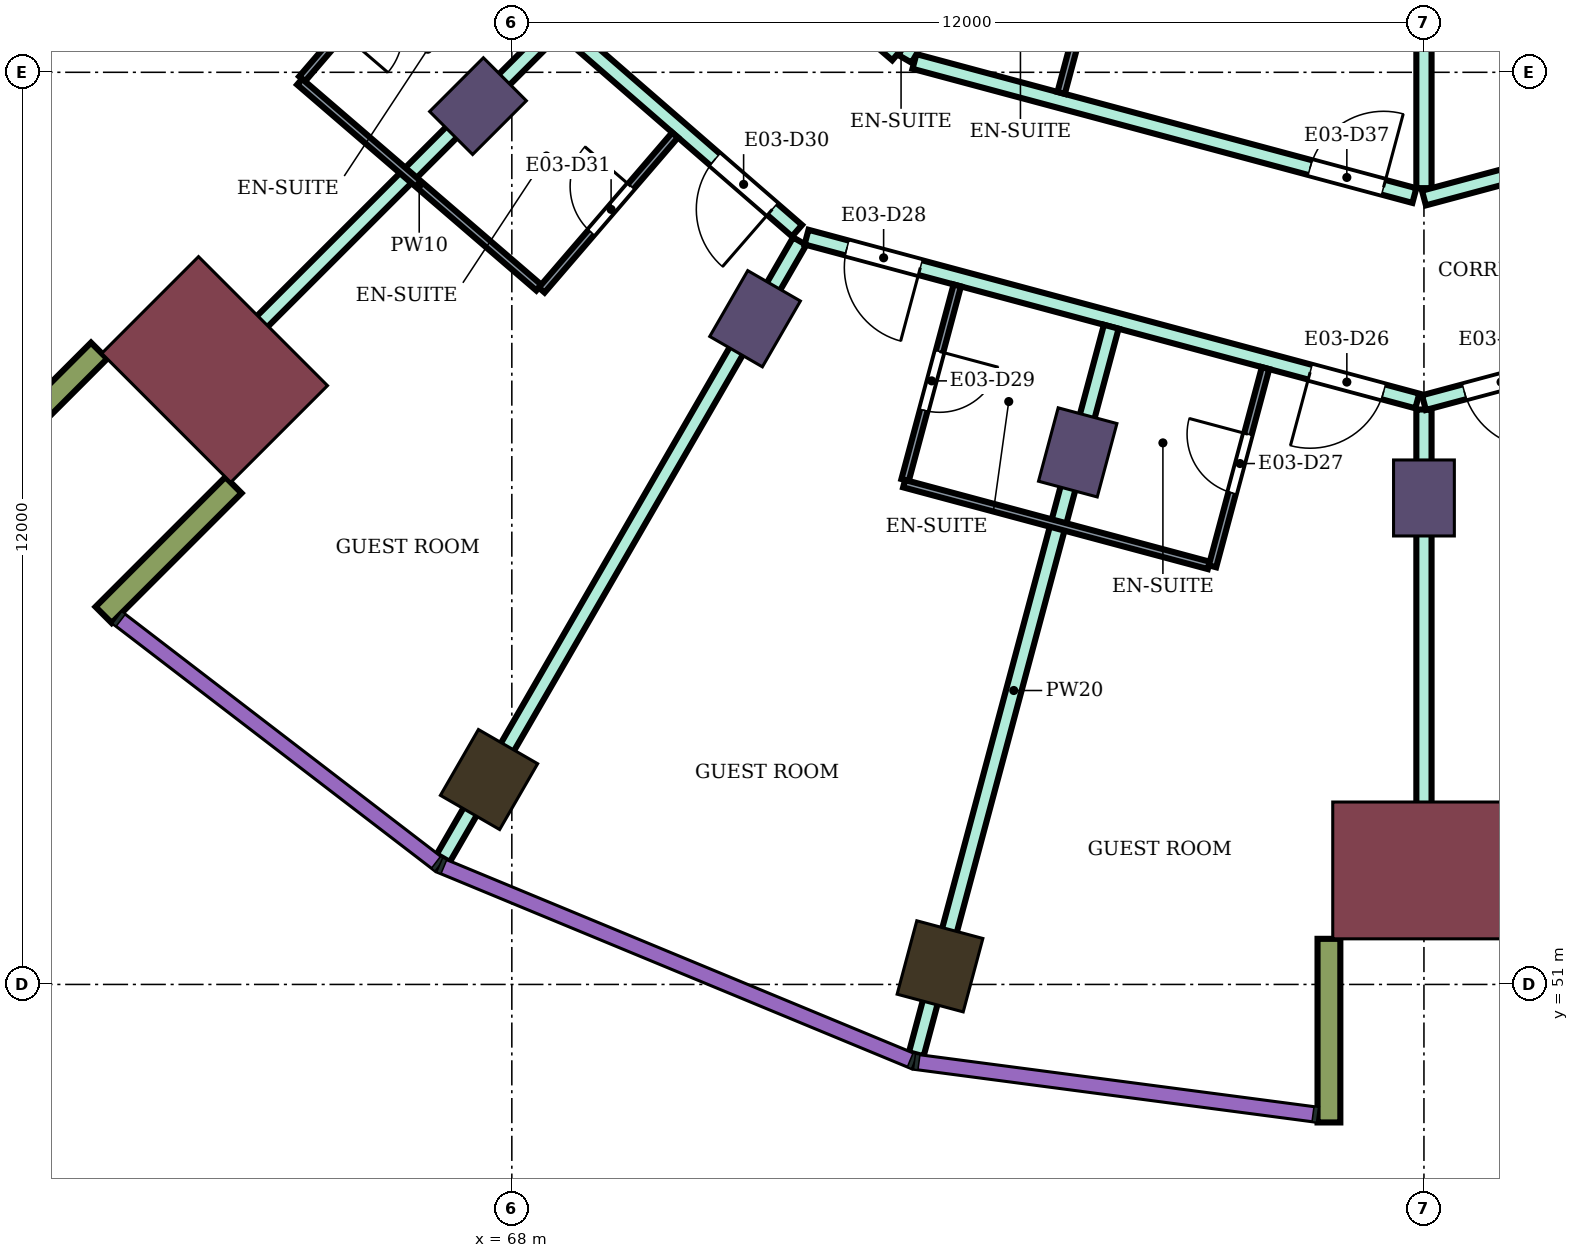
"""IFC4 building model, lengths in metres.
Left out: names, types, materials, properties, quantities, classifications, styles, units other than length and angle.
Written with IfcOpenShell. Run it as: python <this file> out.ifc"""

import sys

from ifc_helpers import new_model, si_unit, direction, frame, frame_2d, origin, origin_2d, place, context, subcontext, project, spatial, rectangle, extrude, element, fill, save


model = new_model("IFC4")
c1 = context("Model", 3, precision=1e-05, world=origin(), true_north=direction((0.0, 1.0)))
c2 = subcontext(c1, "Body", "Model", "MODEL_VIEW")
j1 = project(units=[si_unit("LENGTHUNIT", "METRE"), si_unit("PLANEANGLEUNIT", "RADIAN")], contexts=[c1])
p1 = place(None, origin())
s1 = spatial("IfcSite", under=j1, at=p1, CompositionType="ELEMENT")
p2 = place(p1, origin())
s2 = spatial("IfcBuilding", under=s1, at=p2, CompositionType="ELEMENT")
p3 = place(p2, frame((0.0, 0.0, 141.9)))
s3 = spatial("IfcBuildingStorey", under=s2, at=p3, CompositionType="ELEMENT", Elevation=141.9)
for number, where, z_axis, x_axis in (
    (1, (67.7, 53.696, 0.0), (0.0, 0.0, 1.0), (-0.5, -0.866, 0.0)),
    (2, (73.633, 51.238, 0.0), (0.0, 0.0, 1.0), (-0.259, -0.966, 0.0)),
):
    element("IfcColumn", number, at=place(p3, frame(where, z_axis=z_axis, x_axis=x_axis)), inside=s3, PredefinedType="COLUMN", context=c2, shape_type="SweptSolid", body=[
        extrude(rectangle(XDim=1.0, YDim=0.9, at=origin_2d()), origin(), (0.0, 0.0, 1.0), 3.9),
    ])
for number, where, z_axis, x_axis in (
    (3, (67.555, 62.555, 0.0), (0.0, 0.0, 1.0), (-0.707, -0.707, 0.0)),
    (4, (71.2, 59.758, 0.0), (0.0, 0.0, 1.0), (-0.5, -0.866, 0.0)),
    (5, (75.445, 58.0, 0.0), (0.0, 0.0, 1.0), (-0.259, -0.966, 0.0)),
    (6, (80.0, 57.4, 0.0), (0.0, 0.0, 1.0), (0.0, -1.0, 0.0)),
):
    element("IfcColumn", number, at=place(p3, frame(where, z_axis=z_axis, x_axis=x_axis)), inside=s3, PredefinedType="COLUMN", context=c2, shape_type="SweptSolid", body=[
        extrude(rectangle(XDim=1.0, YDim=0.8, at=origin_2d()), origin(), (0.0, 0.0, 1.0), 3.9),
    ])
for number, where, z_axis, x_axis in (
    (7, (64.09, 59.09, 0.0), (0.0, 0.0, 1.0), (-0.707, -0.707, 0.0)),
    (8, (80.0, 52.5, 0.0), (0.0, 0.0, 1.0), (0.0, -1.0, 0.0)),
):
    element("IfcColumn", number, at=place(p3, frame(where, z_axis=z_axis, x_axis=x_axis)), inside=s3, PredefinedType="COLUMN", context=c2, shape_type="SweptSolid", body=[
        extrude(rectangle(XDim=1.8, YDim=2.4, at=origin_2d()), origin(), (0.0, 0.0, 1.0), 3.9),
    ])
for number, where, z_axis, x_axis in (
    (9, (62.57, 59.338, 0.0), (0.0, 0.0, 1.0), (-0.707, -0.707, 0.0)),
    (10, (64.338, 57.57, 0.0), (0.0, 0.0, 1.0), (-0.707, -0.707, 0.0)),
    (11, (78.75, 51.6, 0.0), (0.0, 0.0, 1.0), (0.0, -1.0, 0.0)),
):
    element("IfcWall", number, at=place(p3, frame(where, z_axis=z_axis, x_axis=x_axis)), inside=s3, PredefinedType="NOTDEFINED", context=c2, shape_type="SweptSolid", body=[
        extrude(rectangle(XDim=2.416, YDim=0.3, at=frame_2d((1.208, 0.0))), origin(), (0.0, 0.0, 1.0), 3.9),
    ])
p4 = place(p3, frame((63.593, 58.599, 0.0), z_axis=(0.0, 0.0, 1.0), x_axis=(0.707228748718, 0.706984792613, 0.0)))
e12 = element("IfcWall", 12, at=p4, inside=s3, PredefinedType="PARTITIONING", context=c2, shape_type="SweptSolid", body=[
    extrude(rectangle(XDim=7.005, YDim=0.2, at=frame_2d((3.503, 0.0))), origin(), (0.0, 0.0, 1.0), 3.45),
])
p5 = place(p3, frame((67.082, 64.972, 0.0), z_axis=(0.0, 0.0, 1.0), x_axis=(0.755031061605, -0.65568902386, 0.0)))
e13 = element("IfcWall", 13, at=p5, inside=s3, PredefinedType="PARTITIONING", context=c2, shape_type="SweptSolid", body=[
    extrude(rectangle(XDim=6.186, YDim=0.2, at=frame_2d((3.093, 0.0))), origin(), (0.0, 0.0, 1.0), 3.45),
])
p6 = place(p5, frame((4.755, 0.0, 0.0)))
e14 = element("IfcOpeningElement", 14, at=p6, cuts=e13, PredefinedType="OPENING", context=c2, shape_type="SweptSolid", body=[
    extrude(rectangle(XDim=1.0, YDim=2.1, at=frame_2d((0.5, 1.05))), frame((0.0, 0.11, 0.0), z_axis=(0.0, -1.0, 0.0), x_axis=(1.0, 0.0, 0.0)), (0.0, 0.0, 1.0), 0.22),
])
p7 = place(p3, frame((67.097, 52.661, 0.0), z_axis=(0.0, 0.0, 1.0), x_axis=(0.500236379769, 0.865888886841, 0.0)))
e15 = element("IfcWall", 15, at=p7, inside=s3, PredefinedType="PARTITIONING", context=c2, shape_type="SweptSolid", body=[
    extrude(rectangle(XDim=9.375, YDim=0.2, at=frame_2d((4.688, 0.0))), origin(), (0.0, 0.0, 1.0), 3.45),
])
p8 = place(p3, frame((69.158, 66.6, 0.0), z_axis=(0.0, 0.0, 1.0), x_axis=(0.757976058094, -0.652282373943, 0.0)))
e16 = element("IfcWall", 16, at=p8, inside=s3, PredefinedType="PARTITIONING", context=c2, shape_type="SweptSolid", body=[
    extrude(rectangle(XDim=5.16, YDim=0.2, at=frame_2d((2.58, 0.0))), origin(), (0.0, 0.0, 1.0), 3.45),
])
p9 = place(p8, frame((1.6, 0.0, 0.0)))
e17 = element("IfcOpeningElement", 17, at=p9, cuts=e16, PredefinedType="OPENING", context=c2, shape_type="SweptSolid", body=[
    extrude(rectangle(XDim=1.0, YDim=2.1, at=frame_2d((0.5, 1.05))), frame((0.0, 0.11, 0.0), z_axis=(0.0, -1.0, 0.0), x_axis=(1.0, 0.0, 0.0)), (0.0, 0.0, 1.0), 0.22),
])
p10 = place(p3, frame((71.877, 60.832, 0.0), z_axis=(0.0, 0.0, 1.0), x_axis=(0.965852509869, -0.259092510851, 0.0)))
e18 = element("IfcWall", 18, at=p10, inside=s3, PredefinedType="PARTITIONING", context=c2, shape_type="SweptSolid", body=[
    extrude(rectangle(XDim=8.32, YDim=0.2, at=frame_2d((4.16, 0.0))), origin(), (0.0, 0.0, 1.0), 3.45),
])
p11 = place(p10, frame((6.86, 0.0, 0.0)))
e19 = element("IfcOpeningElement", 19, at=p11, cuts=e18, PredefinedType="OPENING", context=c2, shape_type="SweptSolid", body=[
    extrude(rectangle(XDim=1.0, YDim=2.1, at=frame_2d((0.5, 1.05))), frame((0.0, 0.11, 0.0), z_axis=(0.0, -1.0, 0.0), x_axis=(1.0, 0.0, 0.0)), (0.0, 0.0, 1.0), 0.22),
])
p12 = place(p10, frame((0.55, 0.0, 0.0)))
e20 = element("IfcOpeningElement", 20, at=p12, cuts=e18, PredefinedType="OPENING", context=c2, shape_type="SweptSolid", body=[
    extrude(rectangle(XDim=1.0, YDim=2.1, at=frame_2d((0.5, 1.05))), frame((0.0, 0.11, 0.0), z_axis=(0.0, -1.0, 0.0), x_axis=(1.0, 0.0, 0.0)), (0.0, 0.0, 1.0), 0.22),
])
p13 = place(p3, frame((73.297, 63.143, 0.0), z_axis=(0.0, 0.0, 1.0), x_axis=(0.965859030528, -0.25906820173, 0.0)))
e21 = element("IfcWall", 21, at=p13, inside=s3, PredefinedType="PARTITIONING", context=c2, shape_type="SweptSolid", body=[
    extrude(rectangle(XDim=6.81, YDim=0.2, at=frame_2d((3.405, 0.0))), origin(), (0.0, 0.0, 1.0), 3.45),
])
p14 = place(p13, frame((5.39, 0.0, 0.0)))
e22 = element("IfcOpeningElement", 22, at=p14, cuts=e21, PredefinedType="OPENING", context=c2, shape_type="SweptSolid", body=[
    extrude(rectangle(XDim=1.0, YDim=2.1, at=frame_2d((0.5, 1.05))), frame((0.0, 0.11, 0.0), z_axis=(0.0, -1.0, 0.0), x_axis=(1.0, 0.0, 0.0)), (0.0, 0.0, 1.0), 0.22),
])
p15 = place(p3, frame((73.173, 63.176, 0.0), z_axis=(0.0, 0.0, 1.0), x_axis=(0.500239348149, 0.865887171959, 0.0)))
e23 = element("IfcWall", 23, at=p15, inside=s3, PredefinedType="PARTITIONING", context=c2, shape_type="SweptSolid", body=[
    extrude(rectangle(XDim=5.955, YDim=0.2, at=frame_2d((2.978, 0.0))), origin(), (0.0, 0.0, 1.0), 3.45),
])
p16 = place(p3, frame((73.321, 50.081, 0.0), z_axis=(0.0, 0.0, 1.0), x_axis=(0.258889198551, 0.965907025999, 0.0)))
e24 = element("IfcWall", 24, at=p16, inside=s3, PredefinedType="PARTITIONING", context=c2, shape_type="SweptSolid", body=[
    extrude(rectangle(XDim=9.909, YDim=0.2, at=frame_2d((4.955, 0.0))), origin(), (0.0, 0.0, 1.0), 3.45),
])
p17 = place(p3, frame((80.0, 51.8, 0.0), z_axis=(0.0, 0.0, 1.0), x_axis=(0.0, 1.0, 0.0)))
e25 = element("IfcWall", 25, at=p17, inside=s3, PredefinedType="PARTITIONING", context=c2, shape_type="SweptSolid", body=[
    extrude(rectangle(XDim=6.764, YDim=0.2, at=frame_2d((3.382, 0.0))), origin(), (0.0, 0.0, 1.0), 3.45),
])
p18 = place(p3, frame((80.0, 58.654, 0.0), z_axis=(0.0, 0.0, 1.0), x_axis=(0.965979808777, 0.25861749561, 0.0)))
e26 = element("IfcWall", 26, at=p18, inside=s3, PredefinedType="PARTITIONING", context=c2, shape_type="SweptSolid", body=[
    extrude(rectangle(XDim=8.37, YDim=0.2, at=frame_2d((4.185, 0.0))), origin(), (0.0, 0.0, 1.0), 3.45),
])
p19 = place(p18, frame((0.55, 0.0, 0.0)))
e27 = element("IfcOpeningElement", 27, at=p19, cuts=e26, PredefinedType="OPENING", context=c2, shape_type="SweptSolid", body=[
    extrude(rectangle(XDim=1.0, YDim=2.1, at=frame_2d((0.5, 1.05))), frame((0.0, 0.11, 0.0), z_axis=(0.0, -1.0, 0.0), x_axis=(1.0, 0.0, 0.0)), (0.0, 0.0, 1.0), 0.22),
])
p20 = place(p3, frame((80.0, 61.476, 0.0), z_axis=(0.0, 0.0, 1.0), x_axis=(0.0, 1.0, 0.0)))
e28 = element("IfcWall", 28, at=p20, inside=s3, PredefinedType="PARTITIONING", context=c2, shape_type="SweptSolid", body=[
    extrude(rectangle(XDim=5.825, YDim=0.2, at=frame_2d((2.913, 0.0))), origin(), (0.0, 0.0, 1.0), 3.45),
])
p21 = place(p3, frame((80.0, 61.346, 0.0), z_axis=(0.0, 0.0, 1.0), x_axis=(0.965915385935, 0.25885800589, 0.0)))
e29 = element("IfcWall", 29, at=p21, inside=s3, PredefinedType="PARTITIONING", context=c2, shape_type="SweptSolid", body=[
    extrude(rectangle(XDim=6.94, YDim=0.2, at=frame_2d((3.47, 0.0))), origin(), (0.0, 0.0, 1.0), 3.45),
])
p22 = place(p21, frame((3.094, 0.0, 0.0)))
e30 = element("IfcOpeningElement", 30, at=p22, cuts=e29, PredefinedType="OPENING", context=c2, shape_type="SweptSolid", body=[
    extrude(rectangle(XDim=0.9, YDim=2.1, at=frame_2d((0.45, 1.05))), frame((0.0, 0.11, 0.0), z_axis=(0.0, -1.0, 0.0), x_axis=(1.0, 0.0, 0.0)), (0.0, 0.0, 1.0), 0.22),
])
p23 = place(p3, frame((65.24, 62.913, 0.0), z_axis=(0.0, 0.0, 1.0), x_axis=(0.652069888227, 0.758158862553, 0.0)))
e31 = element("IfcWall", 31, at=p23, inside=s3, PredefinedType="PARTITIONING", context=c2, shape_type="SweptSolid", body=[
    extrude(rectangle(XDim=2.75, YDim=0.1, at=frame_2d((1.375, 0.0))), origin(), (0.0, 0.0, 1.0), 3.45),
])
p24 = place(p23, frame((0.8, 0.0, 0.0)))
e32 = element("IfcOpeningElement", 32, at=p24, cuts=e31, PredefinedType="OPENING", context=c2, shape_type="SweptSolid", body=[
    extrude(rectangle(XDim=0.8, YDim=2.1, at=frame_2d((0.4, 1.05))), frame((0.0, 0.06, 0.0), z_axis=(0.0, -1.0, 0.0), x_axis=(1.0, 0.0, 0.0)), (0.0, 0.0, 1.0), 0.12),
])
p25 = place(p3, frame((65.208, 62.875, 0.0), z_axis=(0.0, 0.0, 1.0), x_axis=(0.757943251005, -0.652320495045, 0.0)))
e33 = element("IfcWall", 33, at=p25, inside=s3, PredefinedType="PARTITIONING", context=c2, shape_type="SweptSolid", body=[
    extrude(rectangle(XDim=4.151, YDim=0.1, at=frame_2d((2.076, 0.0))), origin(), (0.0, 0.0, 1.0), 3.45),
])
p26 = place(p3, frame((68.393, 60.135, 0.0), z_axis=(0.0, 0.0, 1.0), x_axis=(0.652061182569, 0.758166349944, 0.0)))
e34 = element("IfcWall", 34, at=p26, inside=s3, PredefinedType="PARTITIONING", context=c2, shape_type="SweptSolid", body=[
    extrude(rectangle(XDim=2.69, YDim=0.1, at=frame_2d((1.345, 0.0))), origin(), (0.0, 0.0, 1.0), 3.45),
])
p27 = place(p26, frame((1.0, 0.0, 0.0)))
e35 = element("IfcOpeningElement", 35, at=p27, cuts=e34, PredefinedType="OPENING", context=c2, shape_type="SweptSolid", body=[
    extrude(rectangle(XDim=0.8, YDim=2.1, at=frame_2d((0.4, 1.05))), frame((0.0, 0.06, 0.0), z_axis=(0.0, -1.0, 0.0), x_axis=(1.0, 0.0, 0.0)), (0.0, 0.0, 1.0), 0.12),
])
p28 = place(p3, frame((73.174, 57.636, 0.0), z_axis=(0.0, 0.0, 1.0), x_axis=(0.258952498977, 0.96589005755, 0.0)))
e36 = element("IfcWall", 36, at=p28, inside=s3, PredefinedType="PARTITIONING", context=c2, shape_type="SweptSolid", body=[
    extrude(rectangle(XDim=2.65, YDim=0.1, at=frame_2d((1.325, 0.0))), origin(), (0.0, 0.0, 1.0), 3.45),
])
p29 = place(p28, frame((0.95, 0.0, 0.0)))
e37 = element("IfcOpeningElement", 37, at=p29, cuts=e36, PredefinedType="OPENING", context=c2, shape_type="SweptSolid", body=[
    extrude(rectangle(XDim=0.8, YDim=2.1, at=frame_2d((0.4, 1.05))), frame((0.0, 0.06, 0.0), z_axis=(0.0, -1.0, 0.0), x_axis=(1.0, 0.0, 0.0)), (0.0, 0.0, 1.0), 0.12),
])
p30 = place(p3, frame((73.161, 57.588, 0.0), z_axis=(0.0, 0.0, 1.0), x_axis=(0.965858994467, -0.259068336173, 0.0)))
e38 = element("IfcWall", 38, at=p30, inside=s3, PredefinedType="PARTITIONING", context=c2, shape_type="SweptSolid", body=[
    extrude(rectangle(XDim=4.15, YDim=0.1, at=frame_2d((2.075, 0.0))), origin(), (0.0, 0.0, 1.0), 3.45),
])
p31 = place(p3, frame((75.227, 62.729, 0.0), z_axis=(0.0, 0.0, 1.0), x_axis=(0.258945475746, 0.965891940432, 0.0)))
e39 = element("IfcWall", 39, at=p31, inside=s3, PredefinedType="PARTITIONING", context=c2, shape_type="SweptSolid", body=[
    extrude(rectangle(XDim=2.7, YDim=0.1, at=frame_2d((1.35, 0.0))), origin(), (0.0, 0.0, 1.0), 3.45),
])
p32 = place(p31, frame((0.9, 0.0, 0.0)))
e40 = element("IfcOpeningElement", 40, at=p32, cuts=e39, PredefinedType="OPENING", context=c2, shape_type="SweptSolid", body=[
    extrude(rectangle(XDim=0.8, YDim=2.1, at=frame_2d((0.4, 1.05))), frame((0.0, 0.06, 0.0), z_axis=(0.0, -1.0, 0.0), x_axis=(1.0, 0.0, 0.0)), (0.0, 0.0, 1.0), 0.12),
])
p33 = place(p3, frame((77.218, 56.501, 0.0), z_axis=(0.0, 0.0, 1.0), x_axis=(0.258591408257, 0.965986792651, 0.0)))
e41 = element("IfcWall", 41, at=p33, inside=s3, PredefinedType="PARTITIONING", context=c2, shape_type="SweptSolid", body=[
    extrude(rectangle(XDim=2.699, YDim=0.1, at=frame_2d((1.35, 0.0))), origin(), (0.0, 0.0, 1.0), 3.45),
])
p34 = place(p33, frame((1.0, 0.0, 0.0)))
e42 = element("IfcOpeningElement", 42, at=p34, cuts=e41, PredefinedType="OPENING", context=c2, shape_type="SweptSolid", body=[
    extrude(rectangle(XDim=0.8, YDim=2.1, at=frame_2d((0.4, 1.05))), frame((0.0, 0.06, 0.0), z_axis=(0.0, -1.0, 0.0), x_axis=(1.0, 0.0, 0.0)), (0.0, 0.0, 1.0), 0.12),
])
p35 = place(p19, frame((1.0, 0.0, 0.0), z_axis=(0.0, 0.0, 1.0), x_axis=(-1.0, 0.0, 0.0)))
e43 = element("IfcDoor", 43, at=p35, inside=s3, OperationType="SINGLE_SWING_LEFT", PredefinedType="DOOR", context=c2, shape_type="SweptSolid", body=[
    extrude(rectangle(XDim=1.0, YDim=2.1, at=frame_2d((0.5, 1.05))), frame((0.0, 0.025, 0.0), z_axis=(0.0, -1.0, 0.0), x_axis=(1.0, 0.0, 0.0)), (0.0, 0.0, 1.0), 0.05),
])
fill(e27, e43)
p36 = place(p11, frame((1.0, 0.0, 0.0), z_axis=(0.0, 0.0, 1.0), x_axis=(-1.0, 0.0, 0.0)))
e44 = element("IfcDoor", 44, at=p36, inside=s3, OperationType="SINGLE_SWING_RIGHT", PredefinedType="DOOR", context=c2, shape_type="SweptSolid", body=[
    extrude(rectangle(XDim=1.0, YDim=2.1, at=frame_2d((0.5, 1.05))), frame((0.0, 0.025, 0.0), z_axis=(0.0, -1.0, 0.0), x_axis=(1.0, 0.0, 0.0)), (0.0, 0.0, 1.0), 0.05),
])
fill(e19, e44)
p37 = place(p34, origin())
e45 = element("IfcDoor", 45, at=p37, inside=s3, OperationType="SINGLE_SWING_RIGHT", PredefinedType="DOOR", context=c2, shape_type="SweptSolid", body=[
    extrude(rectangle(XDim=0.8, YDim=2.1, at=frame_2d((0.4, 1.05))), frame((0.0, 0.025, 0.0), z_axis=(0.0, -1.0, 0.0), x_axis=(1.0, 0.0, 0.0)), (0.0, 0.0, 1.0), 0.05),
])
fill(e42, e45)
p38 = place(p12, frame((1.0, 0.0, 0.0), z_axis=(0.0, 0.0, 1.0), x_axis=(-1.0, 0.0, 0.0)))
e46 = element("IfcDoor", 46, at=p38, inside=s3, OperationType="SINGLE_SWING_LEFT", PredefinedType="DOOR", context=c2, shape_type="SweptSolid", body=[
    extrude(rectangle(XDim=1.0, YDim=2.1, at=frame_2d((0.5, 1.05))), frame((0.0, 0.025, 0.0), z_axis=(0.0, -1.0, 0.0), x_axis=(1.0, 0.0, 0.0)), (0.0, 0.0, 1.0), 0.05),
])
fill(e20, e46)
p39 = place(p29, frame((0.8, 0.0, 0.0), z_axis=(0.0, 0.0, 1.0), x_axis=(-1.0, 0.0, 0.0)))
e47 = element("IfcDoor", 47, at=p39, inside=s3, OperationType="SINGLE_SWING_LEFT", PredefinedType="DOOR", context=c2, shape_type="SweptSolid", body=[
    extrude(rectangle(XDim=0.8, YDim=2.1, at=frame_2d((0.4, 1.05))), frame((0.0, 0.025, 0.0), z_axis=(0.0, -1.0, 0.0), x_axis=(1.0, 0.0, 0.0)), (0.0, 0.0, 1.0), 0.05),
])
fill(e37, e47)
p40 = place(p6, frame((1.0, 0.0, 0.0), z_axis=(0.0, 0.0, 1.0), x_axis=(-1.0, 0.0, 0.0)))
e48 = element("IfcDoor", 48, at=p40, inside=s3, OperationType="SINGLE_SWING_LEFT", PredefinedType="DOOR", context=c2, shape_type="SweptSolid", body=[
    extrude(rectangle(XDim=1.0, YDim=2.1, at=frame_2d((0.5, 1.05))), frame((0.0, 0.025, 0.0), z_axis=(0.0, -1.0, 0.0), x_axis=(1.0, 0.0, 0.0)), (0.0, 0.0, 1.0), 0.05),
])
fill(e14, e48)
p41 = place(p27, origin())
e49 = element("IfcDoor", 49, at=p41, inside=s3, OperationType="SINGLE_SWING_RIGHT", PredefinedType="DOOR", context=c2, shape_type="SweptSolid", body=[
    extrude(rectangle(XDim=0.8, YDim=2.1, at=frame_2d((0.4, 1.05))), frame((0.0, 0.025, 0.0), z_axis=(0.0, -1.0, 0.0), x_axis=(1.0, 0.0, 0.0)), (0.0, 0.0, 1.0), 0.05),
])
fill(e35, e49)
p42 = place(p14, origin())
e50 = element("IfcDoor", 50, at=p42, inside=s3, OperationType="SINGLE_SWING_RIGHT", PredefinedType="DOOR", context=c2, shape_type="SweptSolid", body=[
    extrude(rectangle(XDim=1.0, YDim=2.1, at=frame_2d((0.5, 1.05))), frame((0.0, 0.025, 0.0), z_axis=(0.0, -1.0, 0.0), x_axis=(1.0, 0.0, 0.0)), (0.0, 0.0, 1.0), 0.05),
])
fill(e22, e50)
save(model, sys.argv[1])
